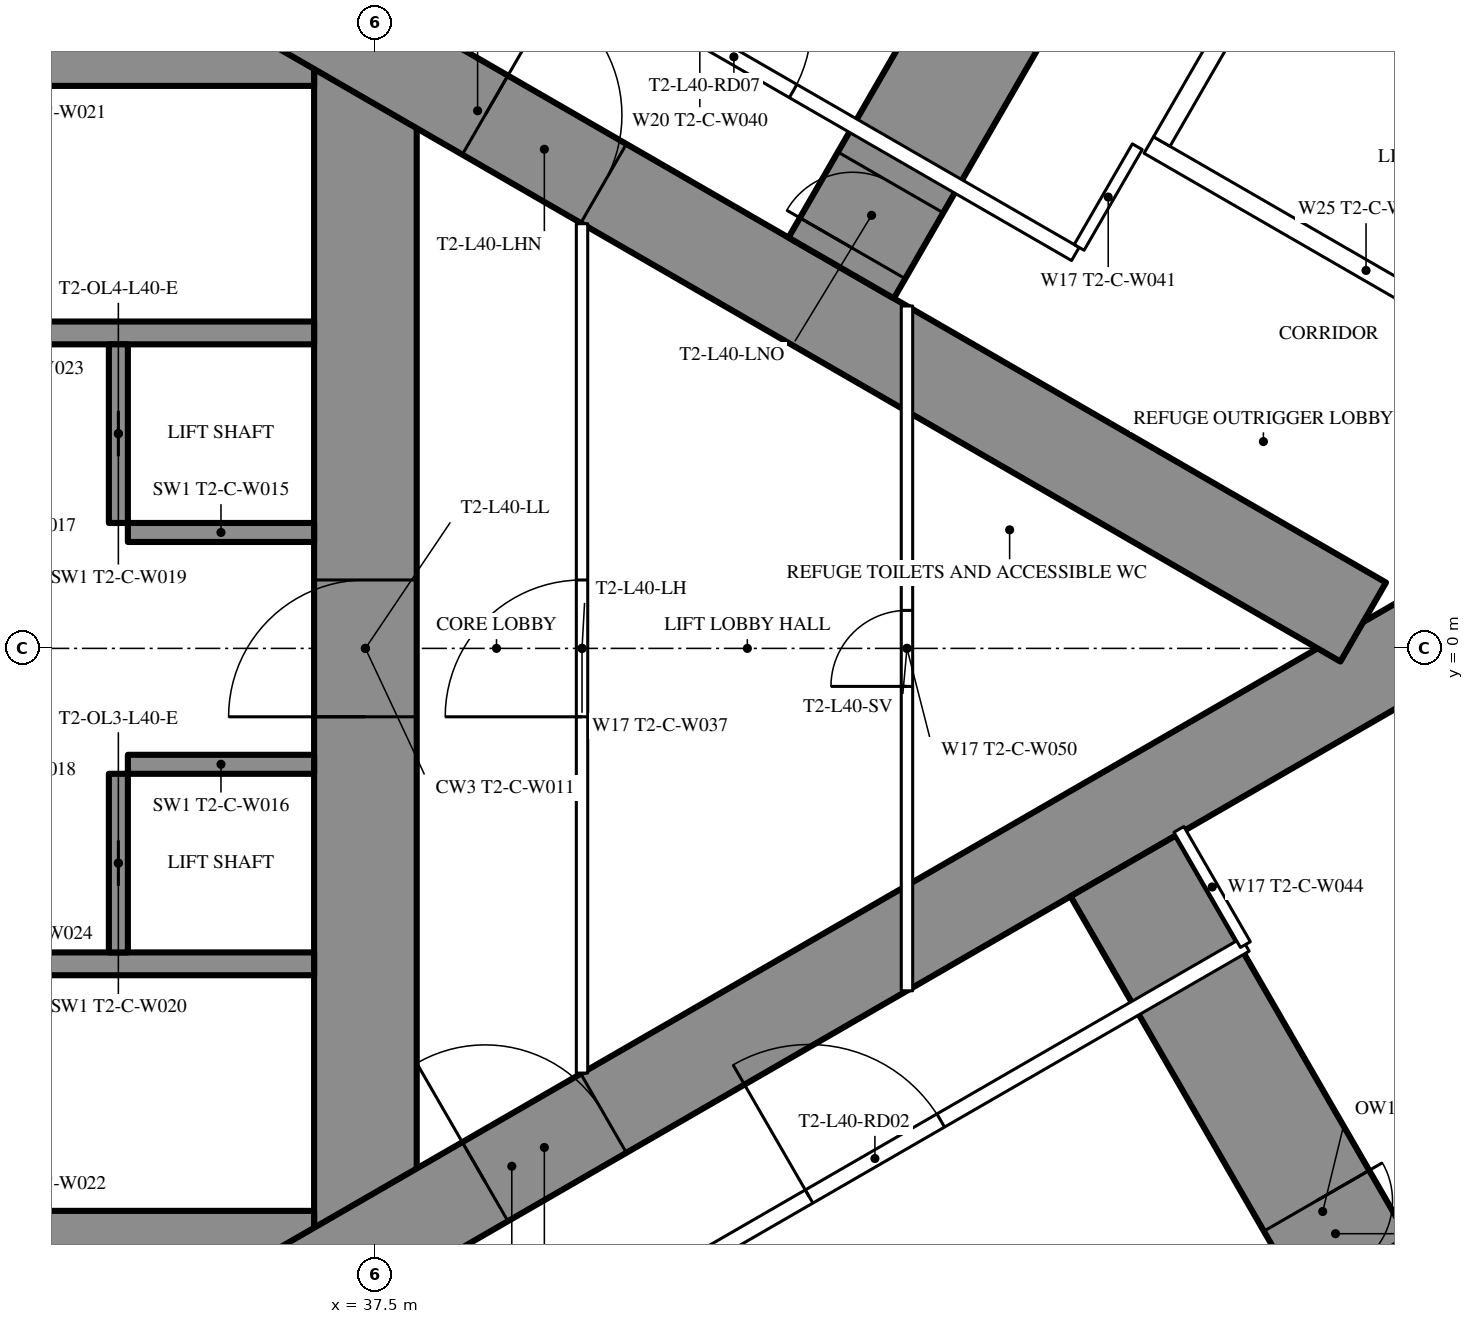
"""IFC4 building model, lengths in metres.
Left out: names, types, materials, properties, quantities, classifications, styles, units other than length and angle.
Written with IfcOpenShell. Run it as: python <this file> out.ifc"""

import sys

from ifc_helpers import new_model, si_unit, direction, frame, frame_2d, origin, place, context, subcontext, project, spatial, rectangle, extrude, element, fill, save


model = new_model("IFC4")
c1 = context("Model", 3, precision=1e-05, world=origin(), true_north=direction((0.0, 1.0)))
c2 = subcontext(c1, "Body", "Model", "MODEL_VIEW")
j1 = project(units=[si_unit("LENGTHUNIT", "METRE"), si_unit("PLANEANGLEUNIT", "RADIAN")], contexts=[c1])
p1 = place(None, origin())
s1 = spatial("IfcSite", under=j1, at=p1, CompositionType="ELEMENT")
p2 = place(p1, origin())
s2 = spatial("IfcBuilding", under=s1, at=p2, CompositionType="ELEMENT")
p3 = place(p2, frame((0.0, 0.0, 152.7)))
s3 = spatial("IfcBuildingStorey", under=s2, at=p3, CompositionType="ELEMENT", Elevation=152.7)
p4 = place(p3, frame((37.375, -8.6, 0.0), z_axis=(0.0, 0.0, 1.0), x_axis=(0.0, 1.0, 0.0)))
e1 = element("IfcWall", 1, at=p4, inside=s3, PredefinedType="SHEAR", context=c2, shape_type="SweptSolid", body=[
    extrude(rectangle(XDim=17.2, YDim=1.35, at=frame_2d((8.6, 0.0))), origin(), (0.0, 0.0, 1.0), 3.6),
])
p5 = place(p4, frame((7.7, 0.0, 0.0)))
e2 = element("IfcOpeningElement", 2, at=p5, cuts=e1, PredefinedType="OPENING", context=c2, shape_type="SweptSolid", body=[
    extrude(rectangle(XDim=1.8, YDim=2.2, at=frame_2d((0.9, 1.1))), frame((0.0, 0.685, 0.0), z_axis=(0.0, -1.0, 0.0), x_axis=(1.0, 0.0, 0.0)), (0.0, 0.0, 1.0), 1.37),
])
p6 = place(p3, frame((28.3, -8.0, 0.0), z_axis=(0.0, 0.0, 1.0), x_axis=(1.0, 0.0, 0.0)))
e3 = element("IfcWall", 3, at=p6, inside=s3, PredefinedType="SHEAR", context=c2, shape_type="SweptSolid", body=[
    extrude(rectangle(XDim=8.4, YDim=1.2, at=frame_2d((4.2, 0.0))), origin(), (0.0, 0.0, 1.0), 3.6),
])
p7 = place(p6, frame((0.25, 0.0, 0.0)))
e4 = element("IfcOpeningElement", 4, at=p7, cuts=e3, PredefinedType="OPENING", context=c2, shape_type="SweptSolid", body=[
    extrude(rectangle(XDim=1.0, YDim=2.2, at=frame_2d((0.5, 1.1))), frame((0.0, 0.61, 0.0), z_axis=(0.0, -1.0, 0.0), x_axis=(1.0, 0.0, 0.0)), (0.0, 0.0, 1.0), 1.22),
])
p8 = place(p3, frame((28.3, 8.0, 0.0), z_axis=(0.0, 0.0, 1.0), x_axis=(1.0, 0.0, 0.0)))
e5 = element("IfcWall", 5, at=p8, inside=s3, PredefinedType="SHEAR", context=c2, shape_type="SweptSolid", body=[
    extrude(rectangle(XDim=8.4, YDim=1.2, at=frame_2d((4.2, 0.0))), origin(), (0.0, 0.0, 1.0), 3.6),
])
p9 = place(p8, frame((0.25, 0.0, 0.0)))
e6 = element("IfcOpeningElement", 6, at=p9, cuts=e5, PredefinedType="OPENING", context=c2, shape_type="SweptSolid", body=[
    extrude(rectangle(XDim=1.0, YDim=2.2, at=frame_2d((0.5, 1.1))), frame((0.0, 0.61, 0.0), z_axis=(0.0, -1.0, 0.0), x_axis=(1.0, 0.0, 0.0)), (0.0, 0.0, 1.0), 1.22),
])
for number, where, z_axis, x_axis in (
    (7, (28.3, -4.15, 0.0), (0.0, 0.0, 1.0), (1.0, 0.0, 0.0)),
    (8, (28.3, 4.15, 0.0), (0.0, 0.0, 1.0), (1.0, 0.0, 0.0)),
):
    element("IfcWall", number, at=place(p3, frame(where, z_axis=z_axis, x_axis=x_axis)), inside=s3, PredefinedType="SHEAR", context=c2, shape_type="SweptSolid", body=[
        extrude(rectangle(XDim=8.4, YDim=0.3, at=frame_2d((4.2, 0.0))), origin(), (0.0, 0.0, 1.0), 3.6),
    ])
p10 = place(p3, frame((34.125, -4.0, 0.0), z_axis=(0.0, 0.0, 1.0), x_axis=(0.0, 1.0, 0.0)))
e9 = element("IfcWall", 9, at=p10, inside=s3, PredefinedType="SHEAR", context=c2, shape_type="SweptSolid", body=[
    extrude(rectangle(XDim=2.35, YDim=0.25, at=frame_2d((1.175, 0.0))), origin(), (0.0, 0.0, 1.0), 3.6),
])
p11 = place(p10, frame((0.875, 0.0, 0.0)))
e10 = element("IfcOpeningElement", 10, at=p11, cuts=e9, PredefinedType="OPENING", context=c2, shape_type="SweptSolid", body=[
    extrude(rectangle(XDim=0.6, YDim=2.0, at=frame_2d((0.3, 1.0))), frame((0.0, 0.135, 0.0), z_axis=(0.0, -1.0, 0.0), x_axis=(1.0, 0.0, 0.0)), (0.0, 0.0, 1.0), 0.27),
])
p12 = place(p3, frame((34.25, -1.525, 0.0), z_axis=(0.0, 0.0, 1.0), x_axis=(1.0, 0.0, 0.0)))
e11 = element("IfcWall", 11, at=p12, inside=s3, PredefinedType="SHEAR", context=c2, shape_type="SweptSolid", body=[
    extrude(rectangle(XDim=2.45, YDim=0.25, at=frame_2d((1.225, 0.0))), origin(), (0.0, 0.0, 1.0), 3.6),
])
p13 = place(p3, frame((34.125, 1.65, 0.0), z_axis=(0.0, 0.0, 1.0), x_axis=(0.0, 1.0, 0.0)))
e12 = element("IfcWall", 12, at=p13, inside=s3, PredefinedType="SHEAR", context=c2, shape_type="SweptSolid", body=[
    extrude(rectangle(XDim=2.35, YDim=0.25, at=frame_2d((1.175, 0.0))), origin(), (0.0, 0.0, 1.0), 3.6),
])
p14 = place(p13, frame((0.875, 0.0, 0.0)))
e13 = element("IfcOpeningElement", 13, at=p14, cuts=e12, PredefinedType="OPENING", context=c2, shape_type="SweptSolid", body=[
    extrude(rectangle(XDim=0.6, YDim=2.0, at=frame_2d((0.3, 1.0))), frame((0.0, 0.135, 0.0), z_axis=(0.0, -1.0, 0.0), x_axis=(1.0, 0.0, 0.0)), (0.0, 0.0, 1.0), 0.27),
])
p15 = place(p3, frame((34.25, 1.525, 0.0), z_axis=(0.0, 0.0, 1.0), x_axis=(1.0, 0.0, 0.0)))
e14 = element("IfcWall", 14, at=p15, inside=s3, PredefinedType="SHEAR", context=c2, shape_type="SweptSolid", body=[
    extrude(rectangle(XDim=2.45, YDim=0.25, at=frame_2d((1.225, 0.0))), origin(), (0.0, 0.0, 1.0), 3.6),
])
p16 = place(p3, frame((27.2, -13.8, 0.0), z_axis=(0.0, 0.0, 1.0), x_axis=(0.866027159892, 0.499996958321, 0.0)))
e15 = element("IfcWall", 15, at=p16, inside=s3, PredefinedType="SHEAR", context=c2, shape_type="SweptSolid", body=[
    extrude(rectangle(XDim=27.947, YDim=1.2, at=frame_2d((13.973, 0.0))), origin(), (0.0, 0.0, 1.0), 3.6),
])
p17 = place(p16, frame((4.6, 0.0, 0.0)))
e16 = element("IfcOpeningElement", 16, at=p17, cuts=e15, PredefinedType="OPENING", context=c2, shape_type="SweptSolid", body=[
    extrude(rectangle(XDim=1.0, YDim=2.2, at=frame_2d((0.5, 1.1))), frame((0.0, 0.61, 0.0), z_axis=(0.0, -1.0, 0.0), x_axis=(1.0, 0.0, 0.0)), (0.0, 0.0, 1.0), 1.22),
])
p18 = place(p16, frame((13.568, 0.0, 0.0)))
e17 = element("IfcOpeningElement", 17, at=p18, cuts=e15, PredefinedType="OPENING", context=c2, shape_type="SweptSolid", body=[
    extrude(rectangle(XDim=1.8, YDim=2.04, at=frame_2d((0.9, 1.02))), frame((0.0, 0.61, 0.0), z_axis=(0.0, -1.0, 0.0), x_axis=(1.0, 0.0, 0.0)), (0.0, 0.0, 1.0), 1.22),
])
p19 = place(p3, frame((27.2, 13.8, 0.0), z_axis=(0.0, 0.0, 1.0), x_axis=(0.866024515034, -0.500001539357, 0.0)))
e18 = element("IfcWall", 18, at=p19, inside=s3, PredefinedType="SHEAR", context=c2, shape_type="SweptSolid", body=[
    extrude(rectangle(XDim=26.907, YDim=1.2, at=frame_2d((13.454, 0.0))), origin(), (0.0, 0.0, 1.0), 3.6),
])
p20 = place(p19, frame((4.6, 0.0, 0.0)))
e19 = element("IfcOpeningElement", 19, at=p20, cuts=e18, PredefinedType="OPENING", context=c2, shape_type="SweptSolid", body=[
    extrude(rectangle(XDim=1.0, YDim=2.2, at=frame_2d((0.5, 1.1))), frame((0.0, 0.61, 0.0), z_axis=(0.0, -1.0, 0.0), x_axis=(1.0, 0.0, 0.0)), (0.0, 0.0, 1.0), 1.22),
])
p21 = place(p19, frame((13.568, 0.0, 0.0)))
e20 = element("IfcOpeningElement", 20, at=p21, cuts=e18, PredefinedType="OPENING", context=c2, shape_type="SweptSolid", body=[
    extrude(rectangle(XDim=1.8, YDim=2.04, at=frame_2d((0.9, 1.02))), frame((0.0, 0.61, 0.0), z_axis=(0.0, -1.0, 0.0), x_axis=(1.0, 0.0, 0.0)), (0.0, 0.0, 1.0), 1.22),
])
p22 = place(p3, frame((47.345, -2.862, 0.0), z_axis=(0.0, 0.0, 1.0), x_axis=(0.500012973899, -0.866017913171, 0.0)))
e21 = element("IfcWall", 21, at=p22, inside=s3, PredefinedType="SHEAR", context=c2, shape_type="SweptSolid", body=[
    extrude(rectangle(XDim=10.499, YDim=1.6, at=frame_2d((5.25, 0.0))), origin(), (0.0, 0.0, 1.0), 3.6),
])
p23 = place(p22, frame((5.087, 0.0, 0.0)))
e22 = element("IfcOpeningElement", 22, at=p23, cuts=e21, PredefinedType="OPENING", context=c2, shape_type="SweptSolid", body=[
    extrude(rectangle(XDim=1.0, YDim=2.2, at=frame_2d((0.5, 1.1))), frame((0.0, 0.81, 0.0), z_axis=(0.0, -1.0, 0.0), x_axis=(1.0, 0.0, 0.0)), (0.0, 0.0, 1.0), 1.62),
])
p24 = place(p3, frame((43.634, 5.004, 0.0), z_axis=(0.0, 0.0, 1.0), x_axis=(0.499995493849, 0.866028005396, 0.0)))
e23 = element("IfcWall", 23, at=p24, inside=s3, PredefinedType="SHEAR", context=c2, shape_type="SweptSolid", body=[
    extrude(rectangle(XDim=10.526, YDim=1.6, at=frame_2d((5.263, 0.0))), origin(), (0.0, 0.0, 1.0), 3.6),
])
p25 = place(p24, frame((0.3, 0.0, 0.0)))
e24 = element("IfcOpeningElement", 24, at=p25, cuts=e23, PredefinedType="OPENING", context=c2, shape_type="SweptSolid", body=[
    extrude(rectangle(XDim=1.0, YDim=2.2, at=frame_2d((0.5, 1.1))), frame((0.0, 0.81, 0.0), z_axis=(0.0, -1.0, 0.0), x_axis=(1.0, 0.0, 0.0)), (0.0, 0.0, 1.0), 1.62),
])
p26 = place(p3, frame((36.834, 10.894, 0.0), z_axis=(0.0, 0.0, 1.0), x_axis=(0.866031655879, -0.499989170898, 0.0)))
e25 = element("IfcWall", 25, at=p26, inside=s3, PredefinedType="PARTITIONING", context=c2, shape_type="SweptSolid", body=[
    extrude(rectangle(XDim=11.41, YDim=0.2, at=frame_2d((5.705, 0.0))), origin(), (0.0, 0.0, 1.0), 3.35),
])
p27 = place(p26, frame((5.323, 0.0, 0.0)))
e26 = element("IfcOpeningElement", 26, at=p27, cuts=e25, PredefinedType="OPENING", context=c2, shape_type="SweptSolid", body=[
    extrude(rectangle(XDim=1.8, YDim=2.04, at=frame_2d((0.9, 1.02))), frame((0.0, 0.11, 0.0), z_axis=(0.0, -1.0, 0.0), x_axis=(1.0, 0.0, 0.0)), (0.0, 0.0, 1.0), 0.22),
])
p28 = place(p3, frame((46.765, 5.275, 0.0), z_axis=(0.0, 0.0, 1.0), x_axis=(0.499915892944, 0.866073957571, 0.0)))
e27 = element("IfcWall", 27, at=p28, inside=s3, PredefinedType="PARTITIONING", context=c2, shape_type="SweptSolid", body=[
    extrude(rectangle(XDim=1.53, YDim=0.15, at=frame_2d((0.765, 0.0))), origin(), (0.0, 0.0, 1.0), 3.35),
])
p29 = place(p3, frame((27.903, -16.05, 0.0), z_axis=(0.0, 0.0, 1.0), x_axis=(0.86602417537, 0.500002127671, 0.0)))
e28 = element("IfcWall", 28, at=p29, inside=s3, PredefinedType="PARTITIONING", context=c2, shape_type="SweptSolid", body=[
    extrude(rectangle(XDim=24.307, YDim=0.2, at=frame_2d((12.153, 0.0))), origin(), (0.0, 0.0, 1.0), 3.35),
])
p30 = place(p29, frame((4.162, 0.0, 0.0)))
e29 = element("IfcOpeningElement", 29, at=p30, cuts=e28, PredefinedType="OPENING", context=c2, shape_type="SweptSolid", body=[
    extrude(rectangle(XDim=2.0, YDim=2.4, at=frame_2d((1.0, 1.2))), frame((0.0, 0.11, 0.0), z_axis=(0.0, -1.0, 0.0), x_axis=(1.0, 0.0, 0.0)), (0.0, 0.0, 1.0), 0.22),
])
p31 = place(p29, frame((17.678, 0.0, 0.0)))
e30 = element("IfcOpeningElement", 30, at=p31, cuts=e28, PredefinedType="OPENING", context=c2, shape_type="SweptSolid", body=[
    extrude(rectangle(XDim=2.0, YDim=2.4, at=frame_2d((1.0, 1.2))), frame((0.0, 0.11, 0.0), z_axis=(0.0, -1.0, 0.0), x_axis=(1.0, 0.0, 0.0)), (0.0, 0.0, 1.0), 0.22),
])
p32 = place(p3, frame((48.953, -3.897, 0.0), z_axis=(0.0, 0.0, 1.0), x_axis=(-0.499980071345, 0.866036909293, 0.0)))
e31 = element("IfcWall", 31, at=p32, inside=s3, PredefinedType="PARTITIONING", context=c2, shape_type="SweptSolid", body=[
    extrude(rectangle(XDim=1.75, YDim=0.15, at=frame_2d((0.875, 0.0))), origin(), (0.0, 0.0, 1.0), 3.35),
])
p33 = place(p3, frame((40.225, -5.587, 0.0), z_axis=(0.0, 0.0, 1.0), x_axis=(0.0, 1.0, 0.0)))
e32 = element("IfcWall", 32, at=p33, inside=s3, PredefinedType="PARTITIONING", context=c2, shape_type="SweptSolid", body=[
    extrude(rectangle(XDim=11.174, YDim=0.15, at=frame_2d((5.587, 0.0))), origin(), (0.0, 0.0, 1.0), 3.35),
])
p34 = place(p33, frame((4.687, 0.0, 0.0)))
e33 = element("IfcOpeningElement", 33, at=p34, cuts=e32, PredefinedType="OPENING", context=c2, shape_type="SweptSolid", body=[
    extrude(rectangle(XDim=1.8, YDim=2.2, at=frame_2d((0.9, 1.1))), frame((0.0, 0.085, 0.0), z_axis=(0.0, -1.0, 0.0), x_axis=(1.0, 0.0, 0.0)), (0.0, 0.0, 1.0), 0.17),
])
p35 = place(p3, frame((44.5, -4.505, 0.0), z_axis=(0.0, 0.0, 1.0), x_axis=(0.0, 1.0, 0.0)))
e34 = element("IfcWall", 34, at=p35, inside=s3, PredefinedType="PARTITIONING", context=c2, shape_type="SweptSolid", body=[
    extrude(rectangle(XDim=9.009, YDim=0.15, at=frame_2d((4.505, 0.0))), origin(), (0.0, 0.0, 1.0), 3.35),
])
p36 = place(p35, frame((4.005, 0.0, 0.0)))
e35 = element("IfcOpeningElement", 35, at=p36, cuts=e34, PredefinedType="OPENING", context=c2, shape_type="SweptSolid", body=[
    extrude(rectangle(XDim=1.0, YDim=2.2, at=frame_2d((0.5, 1.1))), frame((0.0, 0.085, 0.0), z_axis=(0.0, -1.0, 0.0), x_axis=(1.0, 0.0, 0.0)), (0.0, 0.0, 1.0), 0.17),
])
for number, where, z_axis, x_axis in (
    (36, (47.681, 6.622, 0.0), (0.0, 0.0, 1.0), (0.866, -0.5, 0.0)),
    (37, (49.406, 9.611, 0.0), (0.0, 0.0, 1.0), (0.866, -0.5, 0.0)),
):
    element("IfcWall", number, at=place(p3, frame(where, z_axis=z_axis, x_axis=x_axis)), inside=s3, PredefinedType="PARTITIONING", context=c2, shape_type="SweptSolid", body=[
        extrude(rectangle(XDim=6.6, YDim=0.25, at=frame_2d((3.3, 0.0))), origin(), (0.0, 0.0, 1.0), 3.35),
    ])
p37 = place(p3, frame((47.852, 6.668, 0.0), z_axis=(0.0, 0.0, 1.0), x_axis=(0.499929347863, 0.866066190972, 0.0)))
e38 = element("IfcWall", 38, at=p37, inside=s3, PredefinedType="PARTITIONING", context=c2, shape_type="SweptSolid", body=[
    extrude(rectangle(XDim=3.201, YDim=0.25, at=frame_2d((1.6, 0.0))), origin(), (0.0, 0.0, 1.0), 3.35),
])
p38 = place(p25, origin())
e39 = element("IfcDoor", 39, at=p38, inside=s3, OperationType="SINGLE_SWING_LEFT", PredefinedType="DOOR", context=c2, shape_type="SweptSolid", body=[
    extrude(rectangle(XDim=1.0, YDim=2.2, at=frame_2d((0.5, 1.1))), frame((0.0, 0.025, 0.0), z_axis=(0.0, -1.0, 0.0), x_axis=(1.0, 0.0, 0.0)), (0.0, 0.0, 1.0), 0.05),
])
fill(e24, e39)
p39 = place(p31, origin())
e40 = element("IfcDoor", 40, at=p39, inside=s3, OperationType="DOUBLE_DOOR_SINGLE_SWING", PredefinedType="DOOR", context=c2, shape_type="SweptSolid", body=[
    extrude(rectangle(XDim=2.0, YDim=2.4, at=frame_2d((1.0, 1.2))), frame((0.0, 0.025, 0.0), z_axis=(0.0, -1.0, 0.0), x_axis=(1.0, 0.0, 0.0)), (0.0, 0.0, 1.0), 0.05),
])
fill(e30, e40)
p40 = place(p27, origin())
e41 = element("IfcDoor", 41, at=p40, inside=s3, OperationType="DOUBLE_DOOR_SINGLE_SWING", PredefinedType="DOOR", context=c2, shape_type="SweptSolid", body=[
    extrude(rectangle(XDim=1.8, YDim=2.04, at=frame_2d((0.9, 1.02))), frame((0.0, 0.025, 0.0), z_axis=(0.0, -1.0, 0.0), x_axis=(1.0, 0.0, 0.0)), (0.0, 0.0, 1.0), 0.05),
])
fill(e26, e41)
p41 = place(p23, origin())
e42 = element("IfcDoor", 42, at=p41, inside=s3, OperationType="SINGLE_SWING_LEFT", PredefinedType="DOOR", context=c2, shape_type="SweptSolid", body=[
    extrude(rectangle(XDim=1.0, YDim=2.2, at=frame_2d((0.5, 1.1))), frame((0.0, 0.025, 0.0), z_axis=(0.0, -1.0, 0.0), x_axis=(1.0, 0.0, 0.0)), (0.0, 0.0, 1.0), 0.05),
])
fill(e22, e42)
p42 = place(p34, origin())
e43 = element("IfcDoor", 43, at=p42, inside=s3, OperationType="DOUBLE_DOOR_SINGLE_SWING", PredefinedType="DOOR", context=c2, shape_type="SweptSolid", body=[
    extrude(rectangle(XDim=1.8, YDim=2.2, at=frame_2d((0.9, 1.1))), frame((0.0, 0.025, 0.0), z_axis=(0.0, -1.0, 0.0), x_axis=(1.0, 0.0, 0.0)), (0.0, 0.0, 1.0), 0.05),
])
fill(e33, e43)
p43 = place(p36, origin())
e44 = element("IfcDoor", 44, at=p43, inside=s3, OperationType="SINGLE_SWING_LEFT", PredefinedType="DOOR", context=c2, shape_type="SweptSolid", body=[
    extrude(rectangle(XDim=1.0, YDim=2.2, at=frame_2d((0.5, 1.1))), frame((0.0, 0.025, 0.0), z_axis=(0.0, -1.0, 0.0), x_axis=(1.0, 0.0, 0.0)), (0.0, 0.0, 1.0), 0.05),
])
fill(e35, e44)
p44 = place(p18, origin())
e45 = element("IfcDoor", 45, at=p44, inside=s3, OperationType="DOUBLE_DOOR_SINGLE_SWING", PredefinedType="DOOR", context=c2, shape_type="SweptSolid", body=[
    extrude(rectangle(XDim=1.8, YDim=2.04, at=frame_2d((0.9, 1.02))), frame((0.0, 0.025, 0.0), z_axis=(0.0, -1.0, 0.0), x_axis=(1.0, 0.0, 0.0)), (0.0, 0.0, 1.0), 0.05),
])
fill(e17, e45)
p45 = place(p21, origin())
e46 = element("IfcDoor", 46, at=p45, inside=s3, OperationType="DOUBLE_DOOR_SINGLE_SWING", PredefinedType="DOOR", context=c2, shape_type="SweptSolid", body=[
    extrude(rectangle(XDim=1.8, YDim=2.04, at=frame_2d((0.9, 1.02))), frame((0.0, 0.025, 0.0), z_axis=(0.0, -1.0, 0.0), x_axis=(1.0, 0.0, 0.0)), (0.0, 0.0, 1.0), 0.05),
])
fill(e20, e46)
p46 = place(p5, origin())
e47 = element("IfcDoor", 47, at=p46, inside=s3, OperationType="DOUBLE_DOOR_SINGLE_SWING", PredefinedType="DOOR", context=c2, shape_type="SweptSolid", body=[
    extrude(rectangle(XDim=1.8, YDim=2.2, at=frame_2d((0.9, 1.1))), frame((0.0, 0.025, 0.0), z_axis=(0.0, -1.0, 0.0), x_axis=(1.0, 0.0, 0.0)), (0.0, 0.0, 1.0), 0.05),
])
fill(e2, e47)
p47 = place(p11, origin())
e48 = element("IfcDoor", 48, at=p47, inside=s3, OperationType="SLIDING_TO_LEFT", PredefinedType="DOOR", context=c2, shape_type="SweptSolid", body=[
    extrude(rectangle(XDim=0.6, YDim=2.0, at=frame_2d((0.3, 1.0))), frame((0.0, 0.025, 0.0), z_axis=(0.0, -1.0, 0.0), x_axis=(1.0, 0.0, 0.0)), (0.0, 0.0, 1.0), 0.05),
])
fill(e10, e48)
p48 = place(p14, origin())
e49 = element("IfcDoor", 49, at=p48, inside=s3, OperationType="SLIDING_TO_LEFT", PredefinedType="DOOR", context=c2, shape_type="SweptSolid", body=[
    extrude(rectangle(XDim=0.6, YDim=2.0, at=frame_2d((0.3, 1.0))), frame((0.0, 0.025, 0.0), z_axis=(0.0, -1.0, 0.0), x_axis=(1.0, 0.0, 0.0)), (0.0, 0.0, 1.0), 0.05),
])
fill(e13, e49)
save(model, sys.argv[1])
